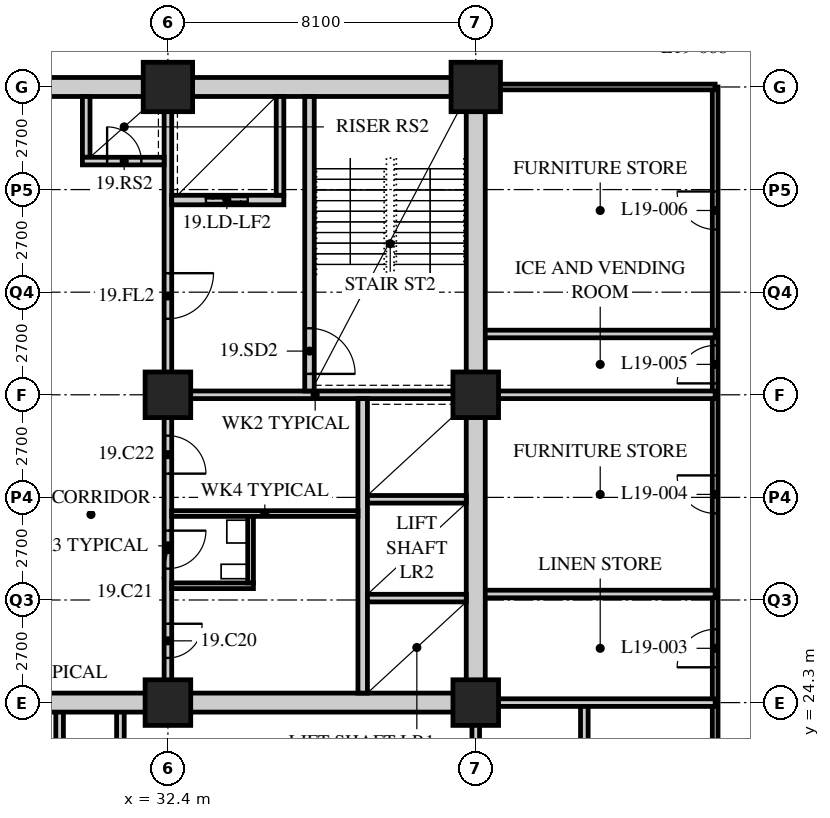
"""IFC4 building model, lengths in metres.
Left out: names, types, materials, properties, quantities, classifications, styles, units other than length and angle.
Written with IfcOpenShell. Run it as: python <this file> out.ifc"""

import sys

from ifc_helpers import new_model, si_unit, direction, frame, frame_2d, origin, origin_2d, place, context, subcontext, project, spatial, rectangle, hollow_rectangle, extrude, element, fill, save


model = new_model("IFC4")
c1 = context("Model", 3, precision=1e-05, world=origin(), true_north=direction((0.0, 1.0)))
c2 = subcontext(c1, "Body", "Model", "MODEL_VIEW")
j1 = project(units=[si_unit("LENGTHUNIT", "METRE"), si_unit("PLANEANGLEUNIT", "RADIAN")], contexts=[c1])
p1 = place(None, origin())
s1 = spatial("IfcSite", under=j1, at=p1, CompositionType="ELEMENT")
p2 = place(p1, origin())
s2 = spatial("IfcBuilding", under=s1, at=p2, CompositionType="ELEMENT")
p3 = place(p2, frame((0.0, 0.0, 77.2)))
s3 = spatial("IfcBuildingStorey", under=s2, at=p3, CompositionType="ELEMENT", Elevation=77.2)
for number, where, z_axis, x_axis in (
    (1, (32.4, 24.3, 0.0), (0.0, 0.0, 1.0), (1.0, 0.0, 0.0)),
    (2, (32.4, 32.4, 0.0), (0.0, 0.0, 1.0), (1.0, 0.0, 0.0)),
):
    element("IfcColumn", number, at=place(p3, frame(where, z_axis=z_axis, x_axis=x_axis)), inside=s3, PredefinedType="COLUMN", context=c2, shape_type="SweptSolid", body=[
        extrude(hollow_rectangle(XDim=1.2, YDim=1.2, WallThickness=0.12, at=origin_2d()), origin(), (0.0, 0.0, 1.0), 3.4),
    ])
p4 = place(p3, frame((32.4, 40.5, 0.0), z_axis=(0.0, 0.0, 1.0), x_axis=(1.0, 0.0, 0.0)))
e3 = element("IfcColumn", 3, at=p4, inside=s3, PredefinedType="COLUMN", context=c2, shape_type="SweptSolid", body=[
    extrude(hollow_rectangle(XDim=1.3, YDim=1.3, WallThickness=0.13, at=origin_2d()), origin(), (0.0, 0.0, 1.0), 3.4),
])
for number, where, z_axis, x_axis in (
    (4, (40.5, 24.3, 0.0), (0.0, 0.0, 1.0), (1.0, 0.0, 0.0)),
    (5, (40.5, 32.4, 0.0), (0.0, 0.0, 1.0), (1.0, 0.0, 0.0)),
):
    element("IfcColumn", number, at=place(p3, frame(where, z_axis=z_axis, x_axis=x_axis)), inside=s3, PredefinedType="COLUMN", context=c2, shape_type="SweptSolid", body=[
        extrude(hollow_rectangle(XDim=1.2, YDim=1.2, WallThickness=0.12, at=origin_2d()), origin(), (0.0, 0.0, 1.0), 3.4),
    ])
p5 = place(p3, frame((40.5, 40.5, 0.0), z_axis=(0.0, 0.0, 1.0), x_axis=(1.0, 0.0, 0.0)))
e6 = element("IfcColumn", 6, at=p5, inside=s3, PredefinedType="COLUMN", context=c2, shape_type="SweptSolid", body=[
    extrude(hollow_rectangle(XDim=1.3, YDim=1.3, WallThickness=0.13, at=origin_2d()), origin(), (0.0, 0.0, 1.0), 3.4),
])
p6 = place(p3, frame((46.8, 18.0, 0.0), z_axis=(0.0, 0.0, 1.0), x_axis=(0.0, 1.0, 0.0)))
e7 = element("IfcWall", 7, at=p6, inside=s3, PredefinedType="PARTITIONING", context=c2, shape_type="SweptSolid", body=[
    extrude(rectangle(XDim=22.5, YDim=0.15, at=frame_2d((11.25, 0.0))), origin(), (0.0, 0.0, 1.0), 3.19),
])
p7 = place(p6, frame((7.229, 0.0, 0.0)))
e8 = element("IfcOpeningElement", 8, at=p7, cuts=e7, PredefinedType="OPENING", context=c2, shape_type="SweptSolid", body=[
    extrude(rectangle(XDim=1.0, YDim=2.1, at=frame_2d((0.5, 1.05))), frame((0.0, 0.085, 0.0), z_axis=(0.0, -1.0, 0.0), x_axis=(1.0, 0.0, 0.0)), (0.0, 0.0, 1.0), 0.17),
])
p8 = place(p6, frame((11.279, 0.0, 0.0)))
e9 = element("IfcOpeningElement", 9, at=p8, cuts=e7, PredefinedType="OPENING", context=c2, shape_type="SweptSolid", body=[
    extrude(rectangle(XDim=1.0, YDim=2.1, at=frame_2d((0.5, 1.05))), frame((0.0, 0.085, 0.0), z_axis=(0.0, -1.0, 0.0), x_axis=(1.0, 0.0, 0.0)), (0.0, 0.0, 1.0), 0.17),
])
p9 = place(p6, frame((14.7, 0.0, 0.0)))
e10 = element("IfcOpeningElement", 10, at=p9, cuts=e7, PredefinedType="OPENING", context=c2, shape_type="SweptSolid", body=[
    extrude(rectangle(XDim=1.0, YDim=2.1, at=frame_2d((0.5, 1.05))), frame((0.0, 0.085, 0.0), z_axis=(0.0, -1.0, 0.0), x_axis=(1.0, 0.0, 0.0)), (0.0, 0.0, 1.0), 0.17),
])
p10 = place(p6, frame((18.75, 0.0, 0.0)))
e11 = element("IfcOpeningElement", 11, at=p10, cuts=e7, PredefinedType="OPENING", context=c2, shape_type="SweptSolid", body=[
    extrude(rectangle(XDim=1.0, YDim=2.1, at=frame_2d((0.5, 1.05))), frame((0.0, 0.085, 0.0), z_axis=(0.0, -1.0, 0.0), x_axis=(1.0, 0.0, 0.0)), (0.0, 0.0, 1.0), 0.17),
])
p11 = place(p3, frame((46.8, 40.5, 0.0), z_axis=(0.0, 0.0, 1.0), x_axis=(-1.0, 0.0, 0.0)))
e12 = element("IfcWall", 12, at=p11, inside=s3, PredefinedType="PARTITIONING", context=c2, shape_type="SweptSolid", body=[
    extrude(rectangle(XDim=6.1, YDim=0.15, at=frame_2d((3.05, 0.0))), origin(), (0.0, 0.0, 1.0), 2.428),
])
p12 = place(p3, frame((40.5, 32.4, 0.0), z_axis=(0.0, 0.0, 1.0), x_axis=(1.0, 0.0, 0.0)))
e13 = element("IfcWall", 13, at=p12, inside=s3, PredefinedType="SOLIDWALL", context=c2, shape_type="SweptSolid", body=[
    extrude(rectangle(XDim=6.3, YDim=0.2, at=frame_2d((3.15, 0.0))), origin(), (0.0, 0.0, 1.0), 2.428),
])
for number, where, z_axis, x_axis in (
    (14, (46.8, 27.157, 0.0), (0.0, 0.0, 1.0), (-1.0, 0.0, 0.0)),
    (15, (46.8, 34.0, 0.0), (0.0, 0.0, 1.0), (-1.0, 0.0, 0.0)),
):
    element("IfcWall", number, at=place(p3, frame(where, z_axis=z_axis, x_axis=x_axis)), inside=s3, PredefinedType="SOLIDWALL", context=c2, shape_type="SweptSolid", body=[
        extrude(rectangle(XDim=6.3, YDim=0.2, at=frame_2d((3.15, 0.0))), origin(), (0.0, 0.0, 1.0), 3.19),
    ])
p13 = place(p3, frame((40.5, 18.0, 0.0), z_axis=(0.0, 0.0, 1.0), x_axis=(0.0, 1.0, 0.0)))
e16 = element("IfcWall", 16, at=p13, inside=s3, PredefinedType="SOLIDWALL", context=c2, shape_type="SweptSolid", body=[
    extrude(rectangle(XDim=6.3, YDim=0.2, at=frame_2d((3.15, 0.0))), origin(), (0.0, 0.0, 1.0), 2.428),
])
for number, where, z_axis, x_axis in (
    (17, (31.15, 18.0, 0.0), (0.0, 0.0, 1.0), (0.0, 1.0, 0.0)),
    (18, (43.357, 18.0, 0.0), (0.0, 0.0, 1.0), (0.0, 1.0, 0.0)),
    (19, (29.55, 18.0, 0.0), (0.0, 0.0, 1.0), (0.0, 1.0, 0.0)),
):
    element("IfcWall", number, at=place(p3, frame(where, z_axis=z_axis, x_axis=x_axis)), inside=s3, PredefinedType="SOLIDWALL", context=c2, shape_type="SweptSolid", body=[
        extrude(rectangle(XDim=6.3, YDim=0.2, at=frame_2d((3.15, 0.0))), origin(), (0.0, 0.0, 1.0), 3.19),
    ])
p14 = place(p3, frame((40.5, 24.3, 0.0), z_axis=(0.0, 0.0, 1.0), x_axis=(1.0, 0.0, 0.0)))
e20 = element("IfcWall", 20, at=p14, inside=s3, PredefinedType="SOLIDWALL", context=c2, shape_type="SweptSolid", body=[
    extrude(rectangle(XDim=6.3, YDim=0.2, at=frame_2d((3.15, 0.0))), origin(), (0.0, 0.0, 1.0), 2.428),
])
p15 = place(p3, frame((15.95, 24.3, 0.0), z_axis=(0.0, 0.0, 1.0), x_axis=(1.0, 0.0, 0.0)))
e21 = element("IfcWall", 21, at=p15, inside=s3, PredefinedType="SOLIDWALL", context=c2, shape_type="SweptSolid", body=[
    extrude(rectangle(XDim=24.8, YDim=0.5, at=frame_2d((12.4, 0.0))), origin(), (0.0, 0.0, 1.0), 2.428),
])
p16 = place(p15, frame((11.5, 0.0, 0.0)))
e22 = element("IfcOpeningElement", 22, at=p16, cuts=e21, PredefinedType="OPENING", context=c2, shape_type="SweptSolid", body=[
    extrude(rectangle(XDim=1.8, YDim=2.4, at=frame_2d((0.9, 1.2))), frame((0.0, 0.26, 0.0), z_axis=(0.0, -1.0, 0.0), x_axis=(1.0, 0.0, 0.0)), (0.0, 0.0, 1.0), 0.52),
])
p17 = place(p3, frame((15.95, 40.5, 0.0), z_axis=(0.0, 0.0, 1.0), x_axis=(1.0, 0.0, 0.0)))
e23 = element("IfcWall", 23, at=p17, inside=s3, PredefinedType="SOLIDWALL", context=c2, shape_type="SweptSolid", body=[
    extrude(rectangle(XDim=24.8, YDim=0.5, at=frame_2d((12.4, 0.0))), origin(), (0.0, 0.0, 1.0), 2.428),
])
p18 = place(p17, frame((11.5, 0.0, 0.0)))
e24 = element("IfcOpeningElement", 24, at=p18, cuts=e23, PredefinedType="OPENING", context=c2, shape_type="SweptSolid", body=[
    extrude(rectangle(XDim=1.8, YDim=2.4, at=frame_2d((0.9, 1.2))), frame((0.0, 0.26, 0.0), z_axis=(0.0, -1.0, 0.0), x_axis=(1.0, 0.0, 0.0)), (0.0, 0.0, 1.0), 0.52),
])
p19 = place(p3, frame((40.5, 24.55, 0.0), z_axis=(0.0, 0.0, 1.0), x_axis=(0.0, 1.0, 0.0)))
e25 = element("IfcWall", 25, at=p19, inside=s3, PredefinedType="SOLIDWALL", context=c2, shape_type="SweptSolid", body=[
    extrude(rectangle(XDim=15.7, YDim=0.5, at=frame_2d((7.85, 0.0))), origin(), (0.0, 0.0, 1.0), 2.428),
])
p20 = place(p3, frame((32.3, 32.4, 0.0), z_axis=(0.0, 0.0, 1.0), x_axis=(1.0, 0.0, 0.0)))
e26 = element("IfcWall", 26, at=p20, inside=s3, PredefinedType="SOLIDWALL", context=c2, shape_type="SweptSolid", body=[
    extrude(rectangle(XDim=7.95, YDim=0.2, at=frame_2d((3.975, 0.0))), origin(), (0.0, 0.0, 1.0), 2.578),
])
p21 = place(p3, frame((32.4, 32.5, 0.0), z_axis=(0.0, 0.0, 1.0), x_axis=(0.0, 1.0, 0.0)))
e27 = element("IfcWall", 27, at=p21, inside=s3, PredefinedType="SOLIDWALL", context=c2, shape_type="SweptSolid", body=[
    extrude(rectangle(XDim=7.75, YDim=0.2, at=frame_2d((3.875, 0.0))), origin(), (0.0, 0.0, 1.0), 2.578),
])
p22 = place(p21, frame((1.9, 0.0, 0.0)))
e28 = element("IfcOpeningElement", 28, at=p22, cuts=e27, PredefinedType="OPENING", context=c2, shape_type="SweptSolid", body=[
    extrude(rectangle(XDim=1.2, YDim=2.1, at=frame_2d((0.6, 1.05))), frame((0.0, 0.11, 0.0), z_axis=(0.0, -1.0, 0.0), x_axis=(1.0, 0.0, 0.0)), (0.0, 0.0, 1.0), 0.22),
])
p23 = place(p3, frame((37.525, 24.55, 0.0), z_axis=(0.0, 0.0, 1.0), x_axis=(0.0, 1.0, 0.0)))
e29 = element("IfcWall", 29, at=p23, inside=s3, PredefinedType="SOLIDWALL", context=c2, shape_type="SweptSolid", body=[
    extrude(rectangle(XDim=7.75, YDim=0.25, at=frame_2d((3.875, 0.0))), origin(), (0.0, 0.0, 1.0), 3.19),
])
for number, where, z_axis, x_axis in (
    (30, (37.65, 27.05, 0.0), (0.0, 0.0, 1.0), (1.0, 0.0, 0.0)),
    (31, (37.65, 29.65, 0.0), (0.0, 0.0, 1.0), (1.0, 0.0, 0.0)),
):
    element("IfcWall", number, at=place(p3, frame(where, z_axis=z_axis, x_axis=x_axis)), inside=s3, PredefinedType="SOLIDWALL", context=c2, shape_type="SweptSolid", body=[
        extrude(rectangle(XDim=2.6, YDim=0.2, at=frame_2d((1.3, 0.0))), origin(), (0.0, 0.0, 1.0), 3.19),
    ])
p24 = place(p3, frame((36.125, 32.5, 0.0), z_axis=(0.0, 0.0, 1.0), x_axis=(0.0, 1.0, 0.0)))
e32 = element("IfcWall", 32, at=p24, inside=s3, PredefinedType="SOLIDWALL", context=c2, shape_type="SweptSolid", body=[
    extrude(rectangle(XDim=7.75, YDim=0.25, at=frame_2d((3.875, 0.0))), origin(), (0.0, 0.0, 1.0), 3.19),
])
p25 = place(p24, frame((0.45, 0.0, 0.0)))
e33 = element("IfcOpeningElement", 33, at=p25, cuts=e32, PredefinedType="OPENING", context=c2, shape_type="SweptSolid", body=[
    extrude(rectangle(XDim=1.2, YDim=2.1, at=frame_2d((0.6, 1.05))), frame((0.0, 0.135, 0.0), z_axis=(0.0, -1.0, 0.0), x_axis=(1.0, 0.0, 0.0)), (0.0, 0.0, 1.0), 0.27),
])
p26 = place(p3, frame((32.5, 37.525, 0.0), z_axis=(0.0, 0.0, 1.0), x_axis=(1.0, 0.0, 0.0)))
e34 = element("IfcWall", 34, at=p26, inside=s3, PredefinedType="SOLIDWALL", context=c2, shape_type="SweptSolid", body=[
    extrude(rectangle(XDim=2.95, YDim=0.25, at=frame_2d((1.475, 0.0))), origin(), (0.0, 0.0, 1.0), 3.19),
])
p27 = place(p26, frame((0.9, 0.0, 0.0)))
e35 = element("IfcOpeningElement", 35, at=p27, cuts=e34, PredefinedType="OPENING", context=c2, shape_type="SweptSolid", body=[
    extrude(rectangle(XDim=1.1, YDim=2.4, at=frame_2d((0.55, 1.2))), frame((0.0, 0.135, 0.0), z_axis=(0.0, -1.0, 0.0), x_axis=(1.0, 0.0, 0.0)), (0.0, 0.0, 1.0), 0.27),
])
p28 = place(p3, frame((35.35, 37.65, 0.0), z_axis=(0.0, 0.0, 1.0), x_axis=(0.0, 1.0, 0.0)))
e36 = element("IfcWall", 36, at=p28, inside=s3, PredefinedType="SOLIDWALL", context=c2, shape_type="SweptSolid", body=[
    extrude(rectangle(XDim=2.6, YDim=0.2, at=frame_2d((1.3, 0.0))), origin(), (0.0, 0.0, 1.0), 3.19),
])
p29 = place(p3, frame((30.25, 38.65, 0.0), z_axis=(0.0, 0.0, 1.0), x_axis=(0.0, 1.0, 0.0)))
e37 = element("IfcWall", 37, at=p29, inside=s3, PredefinedType="SOLIDWALL", context=c2, shape_type="SweptSolid", body=[
    extrude(rectangle(XDim=1.6, YDim=0.2, at=frame_2d((0.8, 0.0))), origin(), (0.0, 0.0, 1.0), 3.19),
])
p30 = place(p3, frame((30.15, 38.55, 0.0), z_axis=(0.0, 0.0, 1.0), x_axis=(1.0, 0.0, 0.0)))
e38 = element("IfcWall", 38, at=p30, inside=s3, PredefinedType="SOLIDWALL", context=c2, shape_type="SweptSolid", body=[
    extrude(rectangle(XDim=2.15, YDim=0.2, at=frame_2d((1.075, 0.0))), origin(), (0.0, 0.0, 1.0), 3.19),
])
p31 = place(p30, frame((0.65, 0.0, 0.0)))
e39 = element("IfcOpeningElement", 39, at=p31, cuts=e38, PredefinedType="OPENING", context=c2, shape_type="SweptSolid", body=[
    extrude(rectangle(XDim=0.9, YDim=2.1, at=frame_2d((0.45, 1.05))), frame((0.0, 0.11, 0.0), z_axis=(0.0, -1.0, 0.0), x_axis=(1.0, 0.0, 0.0)), (0.0, 0.0, 1.0), 0.22),
])
p32 = place(p3, frame((32.4, 24.55, 0.0), z_axis=(0.0, 0.0, 1.0), x_axis=(0.0, 1.0, 0.0)))
e40 = element("IfcWall", 40, at=p32, inside=s3, PredefinedType="PARTITIONING", context=c2, shape_type="SweptSolid", body=[
    extrude(rectangle(XDim=7.75, YDim=0.2, at=frame_2d((3.875, 0.0))), origin(), (0.0, 0.0, 1.0), 2.578),
])
p33 = place(p32, frame((0.925, 0.0, 0.0)))
e41 = element("IfcOpeningElement", 41, at=p33, cuts=e40, PredefinedType="OPENING", context=c2, shape_type="SweptSolid", body=[
    extrude(rectangle(XDim=0.9, YDim=2.1, at=frame_2d((0.45, 1.05))), frame((0.0, 0.11, 0.0), z_axis=(0.0, -1.0, 0.0), x_axis=(1.0, 0.0, 0.0)), (0.0, 0.0, 1.0), 0.22),
])
p34 = place(p32, frame((3.275, 0.0, 0.0)))
e42 = element("IfcOpeningElement", 42, at=p34, cuts=e40, PredefinedType="OPENING", context=c2, shape_type="SweptSolid", body=[
    extrude(rectangle(XDim=1.0, YDim=2.1, at=frame_2d((0.5, 1.05))), frame((0.0, 0.11, 0.0), z_axis=(0.0, -1.0, 0.0), x_axis=(1.0, 0.0, 0.0)), (0.0, 0.0, 1.0), 0.22),
])
p35 = place(p32, frame((5.775, 0.0, 0.0)))
e43 = element("IfcOpeningElement", 43, at=p35, cuts=e40, PredefinedType="OPENING", context=c2, shape_type="SweptSolid", body=[
    extrude(rectangle(XDim=1.0, YDim=2.1, at=frame_2d((0.5, 1.05))), frame((0.0, 0.11, 0.0), z_axis=(0.0, -1.0, 0.0), x_axis=(1.0, 0.0, 0.0)), (0.0, 0.0, 1.0), 0.22),
])
p36 = place(p3, frame((32.5, 27.375, 0.0), z_axis=(0.0, 0.0, 1.0), x_axis=(1.0, 0.0, 0.0)))
e44 = element("IfcWall", 44, at=p36, inside=s3, PredefinedType="PARTITIONING", context=c2, shape_type="SweptSolid", body=[
    extrude(rectangle(XDim=2.15, YDim=0.15, at=frame_2d((1.075, 0.0))), origin(), (0.0, 0.0, 1.0), 3.19),
])
p37 = place(p3, frame((32.5, 29.275, 0.0), z_axis=(0.0, 0.0, 1.0), x_axis=(1.0, 0.0, 0.0)))
e45 = element("IfcWall", 45, at=p37, inside=s3, PredefinedType="PARTITIONING", context=c2, shape_type="SweptSolid", body=[
    extrude(rectangle(XDim=4.9, YDim=0.15, at=frame_2d((2.45, 0.0))), origin(), (0.0, 0.0, 1.0), 3.19),
])
p38 = place(p3, frame((34.575, 27.45, 0.0), z_axis=(0.0, 0.0, 1.0), x_axis=(0.0, 1.0, 0.0)))
e46 = element("IfcWall", 46, at=p38, inside=s3, PredefinedType="PARTITIONING", context=c2, shape_type="SweptSolid", body=[
    extrude(rectangle(XDim=1.75, YDim=0.15, at=frame_2d((0.875, 0.0))), origin(), (0.0, 0.0, 1.0), 3.19),
])
p39 = place(p7, origin())
e47 = element("IfcDoor", 47, at=p39, inside=s3, OperationType="SINGLE_SWING_LEFT", PredefinedType="DOOR", context=c2, shape_type="SweptSolid", body=[
    extrude(rectangle(XDim=1.0, YDim=2.1, at=frame_2d((0.5, 1.05))), frame((0.0, 0.025, 0.0), z_axis=(0.0, -1.0, 0.0), x_axis=(1.0, 0.0, 0.0)), (0.0, 0.0, 1.0), 0.05),
])
fill(e8, e47)
p40 = place(p8, origin())
e48 = element("IfcDoor", 48, at=p40, inside=s3, OperationType="SINGLE_SWING_RIGHT", PredefinedType="DOOR", context=c2, shape_type="SweptSolid", body=[
    extrude(rectangle(XDim=1.0, YDim=2.1, at=frame_2d((0.5, 1.05))), frame((0.0, 0.025, 0.0), z_axis=(0.0, -1.0, 0.0), x_axis=(1.0, 0.0, 0.0)), (0.0, 0.0, 1.0), 0.05),
])
fill(e9, e48)
p41 = place(p9, origin())
e49 = element("IfcDoor", 49, at=p41, inside=s3, OperationType="SINGLE_SWING_LEFT", PredefinedType="DOOR", context=c2, shape_type="SweptSolid", body=[
    extrude(rectangle(XDim=1.0, YDim=2.1, at=frame_2d((0.5, 1.05))), frame((0.0, 0.025, 0.0), z_axis=(0.0, -1.0, 0.0), x_axis=(1.0, 0.0, 0.0)), (0.0, 0.0, 1.0), 0.05),
])
fill(e10, e49)
p42 = place(p10, origin())
e50 = element("IfcDoor", 50, at=p42, inside=s3, OperationType="SINGLE_SWING_RIGHT", PredefinedType="DOOR", context=c2, shape_type="SweptSolid", body=[
    extrude(rectangle(XDim=1.0, YDim=2.1, at=frame_2d((0.5, 1.05))), frame((0.0, 0.025, 0.0), z_axis=(0.0, -1.0, 0.0), x_axis=(1.0, 0.0, 0.0)), (0.0, 0.0, 1.0), 0.05),
])
fill(e11, e50)
p43 = place(p33, origin())
e51 = element("IfcDoor", 51, at=p43, inside=s3, OperationType="SINGLE_SWING_LEFT", PredefinedType="DOOR", context=c2, shape_type="SweptSolid", body=[
    extrude(rectangle(XDim=0.9, YDim=2.1, at=frame_2d((0.45, 1.05))), frame((0.0, 0.025, 0.0), z_axis=(0.0, -1.0, 0.0), x_axis=(1.0, 0.0, 0.0)), (0.0, 0.0, 1.0), 0.05),
])
fill(e41, e51)
p44 = place(p34, origin())
e52 = element("IfcDoor", 52, at=p44, inside=s3, OperationType="SINGLE_SWING_LEFT", PredefinedType="DOOR", context=c2, shape_type="SweptSolid", body=[
    extrude(rectangle(XDim=1.0, YDim=2.1, at=frame_2d((0.5, 1.05))), frame((0.0, 0.025, 0.0), z_axis=(0.0, -1.0, 0.0), x_axis=(1.0, 0.0, 0.0)), (0.0, 0.0, 1.0), 0.05),
])
fill(e42, e52)
p45 = place(p35, origin())
e53 = element("IfcDoor", 53, at=p45, inside=s3, OperationType="SINGLE_SWING_RIGHT", PredefinedType="DOOR", context=c2, shape_type="SweptSolid", body=[
    extrude(rectangle(XDim=1.0, YDim=2.1, at=frame_2d((0.5, 1.05))), frame((0.0, 0.025, 0.0), z_axis=(0.0, -1.0, 0.0), x_axis=(1.0, 0.0, 0.0)), (0.0, 0.0, 1.0), 0.05),
])
fill(e43, e53)
p46 = place(p25, origin())
e54 = element("IfcDoor", 54, at=p46, inside=s3, OperationType="SINGLE_SWING_RIGHT", PredefinedType="DOOR", context=c2, shape_type="SweptSolid", body=[
    extrude(rectangle(XDim=1.2, YDim=2.1, at=frame_2d((0.6, 1.05))), frame((0.0, 0.025, 0.0), z_axis=(0.0, -1.0, 0.0), x_axis=(1.0, 0.0, 0.0)), (0.0, 0.0, 1.0), 0.05),
])
fill(e33, e54)
p47 = place(p22, origin())
e55 = element("IfcDoor", 55, at=p47, inside=s3, OperationType="SINGLE_SWING_LEFT", PredefinedType="DOOR", context=c2, shape_type="SweptSolid", body=[
    extrude(rectangle(XDim=1.2, YDim=2.1, at=frame_2d((0.6, 1.05))), frame((0.0, 0.025, 0.0), z_axis=(0.0, -1.0, 0.0), x_axis=(1.0, 0.0, 0.0)), (0.0, 0.0, 1.0), 0.05),
])
fill(e28, e55)
p48 = place(p31, origin())
e56 = element("IfcDoor", 56, at=p48, inside=s3, OperationType="SINGLE_SWING_LEFT", PredefinedType="DOOR", context=c2, shape_type="SweptSolid", body=[
    extrude(rectangle(XDim=0.9, YDim=2.1, at=frame_2d((0.45, 1.05))), frame((0.0, 0.025, 0.0), z_axis=(0.0, -1.0, 0.0), x_axis=(1.0, 0.0, 0.0)), (0.0, 0.0, 1.0), 0.05),
])
fill(e39, e56)
p49 = place(p27, origin())
e57 = element("IfcDoor", 57, at=p49, inside=s3, OperationType="DOUBLE_DOOR_SLIDING", PredefinedType="DOOR", context=c2, shape_type="SweptSolid", body=[
    extrude(rectangle(XDim=1.1, YDim=2.4, at=frame_2d((0.55, 1.2))), frame((0.0, 0.025, 0.0), z_axis=(0.0, -1.0, 0.0), x_axis=(1.0, 0.0, 0.0)), (0.0, 0.0, 1.0), 0.05),
])
fill(e35, e57)
save(model, sys.argv[1])
